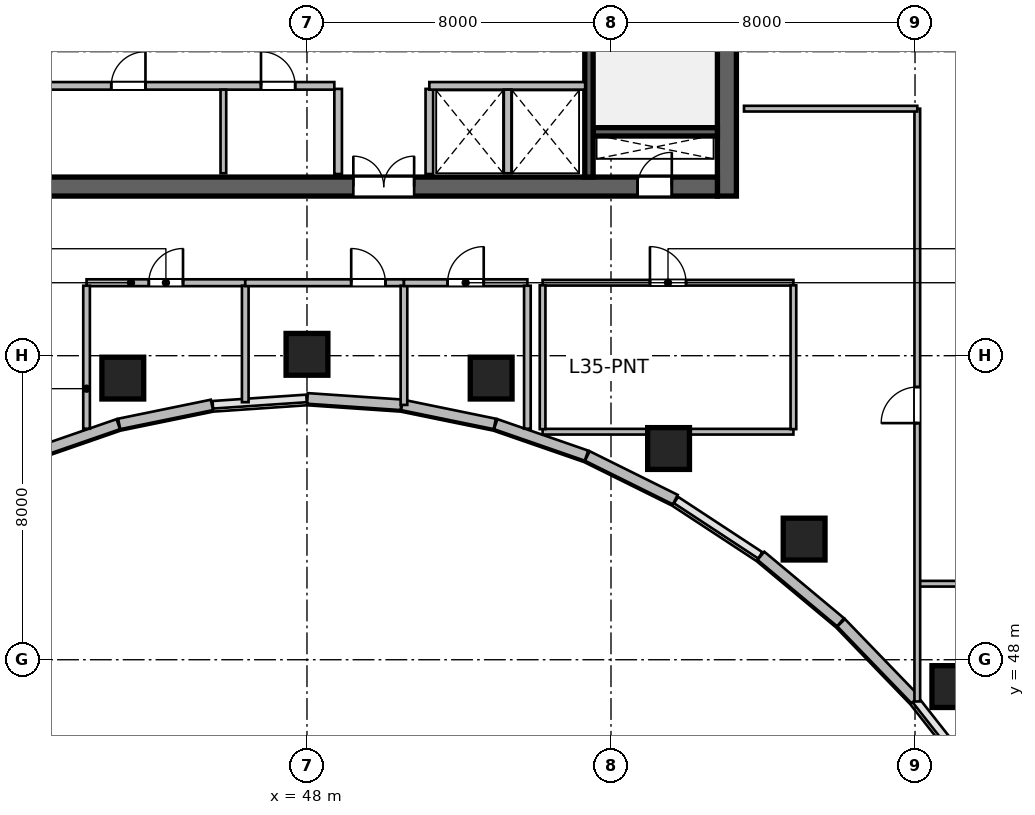
"""IFC4 building model, lengths in metres.
Left out: names, types, materials, properties, quantities, classifications, styles, units other than length and angle.
Written with IfcOpenShell. Run it as: python <this file> out.ifc"""

import sys

from ifc_helpers import new_model, si_unit, direction, frame, frame_2d, origin, origin_2d, place, context, subcontext, project, spatial, rectangle, circle, extrude, source, transform, mapped, element, fill, save


model = new_model("IFC4")
c1 = context("Model", 3, precision=1e-05, world=origin(), true_north=direction((0.0, 1.0)))
c2 = subcontext(c1, "Body", "Model", "MODEL_VIEW")
j1 = project(units=[si_unit("LENGTHUNIT", "METRE"), si_unit("PLANEANGLEUNIT", "RADIAN")], contexts=[c1])
p1 = place(None, origin())
s1 = spatial("IfcSite", under=j1, at=p1, CompositionType="ELEMENT")
p2 = place(p1, origin())
s2 = spatial("IfcBuilding", under=s1, at=p2, CompositionType="ELEMENT")
p3 = place(p2, frame((0.0, 0.0, 146.7)))
s3 = spatial("IfcBuildingStorey", under=s2, at=p3, CompositionType="ELEMENT", Elevation=146.7)
m1 = source(origin(), c2, "Body", "SweptSolid", [
    extrude(rectangle(XDim=12.0, YDim=0.5, at=frame_2d((6.0, 0.0))), origin(), (0.0, 0.0, 1.0), 3.9),
])
p4 = place(p3, frame((59.05, 60.2, 0.0), z_axis=(0.0, 0.0, 1.0), x_axis=(0.0, 1.0, 0.0)))
e1 = element("IfcWall", 1, at=p4, inside=s3, PredefinedType="SHEAR", context=c2, shape_type="MappedRepresentation", body=[
    mapped(m1, transform((0.0, 0.0, 0.0), scale=1.0)),
])
m2 = source(origin(), c2, "Body", "SweptSolid", [
    extrude(rectangle(XDim=21.6, YDim=0.5, at=frame_2d((10.8, 0.0))), origin(), (0.0, 0.0, 1.0), 3.9),
])
p5 = place(p3, frame((37.2, 60.45, 0.0), z_axis=(0.0, 0.0, 1.0), x_axis=(1.0, 0.0, 0.0)))
e2 = element("IfcWall", 2, at=p5, inside=s3, PredefinedType="SHEAR", context=c2, shape_type="MappedRepresentation", body=[
    mapped(m2, transform((0.0, 0.0, 0.0), scale=1.0)),
])
p6 = place(p5, frame((1.1, 0.0, 0.0)))
e3 = element("IfcOpeningElement", 3, at=p6, cuts=e2, PredefinedType="OPENING", context=c2, shape_type="SweptSolid", body=[
    extrude(rectangle(XDim=1.15, YDim=2.15, at=frame_2d((0.575, 1.075))), frame((0.0, 0.26, 0.0), z_axis=(0.0, -1.0, 0.0), x_axis=(1.0, 0.0, 0.0)), (0.0, 0.0, 1.0), 0.52),
])
p7 = place(p5, frame((19.5, 0.0, 0.0)))
e4 = element("IfcOpeningElement", 4, at=p7, cuts=e2, PredefinedType="OPENING", context=c2, shape_type="SweptSolid", body=[
    extrude(rectangle(XDim=0.9, YDim=2.1, at=frame_2d((0.45, 1.05))), frame((0.0, 0.26, 0.0), z_axis=(0.0, -1.0, 0.0), x_axis=(1.0, 0.0, 0.0)), (0.0, 0.0, 1.0), 0.52),
])
p8 = place(p5, frame((12.02, 0.0, 0.0)))
e5 = element("IfcOpeningElement", 5, at=p8, cuts=e2, PredefinedType="OPENING", context=c2, shape_type="SweptSolid", body=[
    extrude(rectangle(XDim=1.6, YDim=2.15, at=frame_2d((0.8, 1.075))), frame((0.0, 0.26, 0.0), z_axis=(0.0, -1.0, 0.0), x_axis=(1.0, 0.0, 0.0)), (0.0, 0.0, 1.0), 0.52),
])
m3 = source(origin(), c2, "Body", "SweptSolid", [
    extrude(rectangle(XDim=3.27, YDim=0.22, at=frame_2d((1.635, 0.0))), origin(), (0.0, 0.0, 1.0), 3.9),
])
p9 = place(p3, frame((55.53, 61.89, 0.0), z_axis=(0.0, 0.0, 1.0), x_axis=(1.0, 0.0, 0.0)))
e6 = element("IfcWall", 6, at=p9, inside=s3, PredefinedType="SHEAR", context=c2, shape_type="MappedRepresentation", body=[
    mapped(m3, transform((0.0, 0.0, 0.0), scale=1.0)),
])
m4 = source(origin(), c2, "Body", "SweptSolid", [
    extrude(rectangle(XDim=11.0, YDim=0.22, at=frame_2d((5.5, 0.0))), origin(), (0.0, 0.0, 1.0), 3.9),
])
p10 = place(p3, frame((55.42, 60.7, 0.0), z_axis=(0.0, 0.0, 1.0), x_axis=(0.0, 1.0, 0.0)))
e7 = element("IfcWall", 7, at=p10, inside=s3, PredefinedType="SHEAR", context=c2, shape_type="MappedRepresentation", body=[
    mapped(m4, transform((0.0, 0.0, 0.0), scale=1.0)),
])
p11 = place(p10, frame((9.545, 0.0, 0.0)))
e8 = element("IfcOpeningElement", 8, at=p11, cuts=e7, PredefinedType="OPENING", context=c2, shape_type="SweptSolid", body=[
    extrude(rectangle(XDim=1.15, YDim=2.15, at=frame_2d((0.575, 1.075))), frame((0.0, 0.12, 0.0), z_axis=(0.0, -1.0, 0.0), x_axis=(1.0, 0.0, 0.0)), (0.0, 0.0, 1.0), 0.24),
])
m5 = source(origin(), c2, "Body", "SweptSolid", [
    extrude(circle(Radius=0.55, at=origin_2d()), origin(), (0.0, 0.0, 1.0), 3.9),
])
for number, where, z_axis, x_axis in (
    (9, (43.154, 55.411, 0.0), (0.0, 0.0, 1.0), (-0.143, 0.99, 0.0)),
    (10, (48.0, 56.036, 0.0), (0.0, 0.0, 1.0), (0.0, 1.0, 0.0)),
    (11, (52.846, 55.411, 0.0), (0.0, 0.0, 1.0), (0.143, 0.99, 0.0)),
    (12, (57.515, 53.558, 0.0), (0.0, 0.0, 1.0), (0.289, 0.957, 0.0)),
    (13, (61.082, 51.175, 0.0), (0.0, 0.0, 1.0), (0.409, 0.912, 0.0)),
    (14, (64.996, 47.294, 0.0), (0.0, 0.0, 1.0), (0.558, 0.83, 0.0)),
):
    element("IfcColumn", number, at=place(p3, frame(where, z_axis=z_axis, x_axis=x_axis)), inside=s3, PredefinedType="COLUMN", context=c2, shape_type="MappedRepresentation", body=[
        mapped(m5, transform((0.0, 0.0, 0.0), scale=1.0)),
    ])
m6 = source(origin(), c2, "Body", "SweptSolid", [
    extrude(rectangle(XDim=2.812, YDim=0.28, at=frame_2d((1.406, 0.0))), origin(), (0.0, 0.0, 1.0), 3.65),
])
p12 = place(p3, frame((64.008, 46.95, 0.0), z_axis=(0.0, 0.0, 1.0), x_axis=(-0.694583668785, 0.719411931411, 0.0)))
e15 = element("IfcWall", 15, at=p12, inside=s3, PredefinedType="SOLIDWALL", context=c2, shape_type="MappedRepresentation", body=[
    mapped(m6, transform((0.0, 0.0, 0.0), scale=1.0)),
])
m7 = source(origin(), c2, "Body", "SweptSolid", [
    extrude(rectangle(XDim=2.729, YDim=0.28, at=frame_2d((1.365, 0.0))), origin(), (0.0, 0.0, 1.0), 3.65),
])
p13 = place(p3, frame((62.041, 48.987, 0.0), z_axis=(0.0, 0.0, 1.0), x_axis=(-0.767957284255, 0.640501061326, 0.0)))
e16 = element("IfcWall", 16, at=p13, inside=s3, PredefinedType="SOLIDWALL", context=c2, shape_type="MappedRepresentation", body=[
    mapped(m7, transform((0.0, 0.0, 0.0), scale=1.0)),
])
m8 = source(origin(), c2, "Body", "SweptSolid", [
    extrude(rectangle(XDim=2.584, YDim=0.28, at=frame_2d((1.292, 0.0))), origin(), (0.0, 0.0, 1.0), 3.65),
])
p14 = place(p3, frame((57.692, 52.213, 0.0), z_axis=(0.0, 0.0, 1.0), x_axis=(-0.895989792847, 0.44407464588, 0.0)))
e17 = element("IfcWall", 17, at=p14, inside=s3, PredefinedType="SOLIDWALL", context=c2, shape_type="MappedRepresentation", body=[
    mapped(m8, transform((0.0, 0.0, 0.0), scale=1.0)),
])
m9 = source(origin(), c2, "Body", "SweptSolid", [
    extrude(rectangle(XDim=2.53, YDim=0.28, at=frame_2d((1.265, 0.0))), origin(), (0.0, 0.0, 1.0), 3.65),
])
p15 = place(p3, frame((55.355, 53.37, 0.0), z_axis=(0.0, 0.0, 1.0), x_axis=(-0.944872429646, 0.327438683872, 0.0)))
e18 = element("IfcWall", 18, at=p15, inside=s3, PredefinedType="SOLIDWALL", context=c2, shape_type="MappedRepresentation", body=[
    mapped(m9, transform((0.0, 0.0, 0.0), scale=1.0)),
])
m10 = source(origin(), c2, "Body", "SweptSolid", [
    extrude(rectangle(XDim=2.491, YDim=0.28, at=frame_2d((1.246, 0.0))), origin(), (0.0, 0.0, 1.0), 3.65),
])
p16 = place(p3, frame((52.942, 54.205, 0.0), z_axis=(0.0, 0.0, 1.0), x_axis=(-0.979630885979, 0.200806691214, 0.0)))
e19 = element("IfcWall", 19, at=p16, inside=s3, PredefinedType="SOLIDWALL", context=c2, shape_type="MappedRepresentation", body=[
    mapped(m10, transform((0.0, 0.0, 0.0), scale=1.0)),
])
m11 = source(origin(), c2, "Body", "SweptSolid", [
    extrude(rectangle(XDim=2.471, YDim=0.28, at=frame_2d((1.236, 0.0))), origin(), (0.0, 0.0, 1.0), 3.65),
])
p17 = place(p3, frame((50.478, 54.708, 0.0), z_axis=(0.0, 0.0, 1.0), x_axis=(-0.997708006929, 0.067666335123, 0.0)))
e20 = element("IfcWall", 20, at=p17, inside=s3, PredefinedType="SOLIDWALL", context=c2, shape_type="MappedRepresentation", body=[
    mapped(m11, transform((0.0, 0.0, 0.0), scale=1.0)),
])
p18 = place(p3, frame((45.498, 54.705, 0.0), z_axis=(0.0, 0.0, 1.0), x_axis=(-0.979630885979, -0.200806691214, 0.0)))
e21 = element("IfcWall", 21, at=p18, inside=s3, PredefinedType="SOLIDWALL", context=c2, shape_type="MappedRepresentation", body=[
    mapped(m10, transform((0.0, 0.0, 0.0), scale=1.0)),
])
p19 = place(p3, frame((43.035, 54.198, 0.0), z_axis=(0.0, 0.0, 1.0), x_axis=(-0.944872429646, -0.327438683872, 0.0)))
e22 = element("IfcWall", 22, at=p19, inside=s3, PredefinedType="SOLIDWALL", context=c2, shape_type="MappedRepresentation", body=[
    mapped(m9, transform((0.0, 0.0, 0.0), scale=1.0)),
])
m12 = source(origin(), c2, "Body", "SweptSolid", [
    extrude(rectangle(XDim=2.24, YDim=0.2, at=frame_2d((1.12, 0.0))), origin(), (0.0, 0.0, 1.0), 3.65),
])
for number, where, z_axis, x_axis in (
    (23, (48.82, 60.78, 0.0), (0.0, 0.0, 1.0), (0.0, 1.0, 0.0)),
    (24, (51.22, 60.78, 0.0), (0.0, 0.0, 1.0), (0.0, 1.0, 0.0)),
):
    element("IfcWall", number, at=place(p3, frame(where, z_axis=z_axis, x_axis=x_axis)), inside=s3, PredefinedType="SOLIDWALL", context=c2, shape_type="MappedRepresentation", body=[
        mapped(m12, transform((0.0, 0.0, 0.0), scale=1.0)),
    ])
m13 = source(origin(), c2, "Body", "SweptSolid", [
    extrude(rectangle(XDim=8.02, YDim=0.2, at=frame_2d((4.01, 0.0))), origin(), (0.0, 0.0, 1.0), 3.65),
])
p20 = place(p3, frame((40.7, 63.1, 0.0), z_axis=(0.0, 0.0, 1.0), x_axis=(1.0, 0.0, 0.0)))
e25 = element("IfcWall", 25, at=p20, inside=s3, PredefinedType="SOLIDWALL", context=c2, shape_type="MappedRepresentation", body=[
    mapped(m13, transform((0.0, 0.0, 0.0), scale=1.0)),
])
p21 = place(p20, frame((2.15, 0.0, 0.0)))
e26 = element("IfcOpeningElement", 26, at=p21, cuts=e25, PredefinedType="OPENING", context=c2, shape_type="SweptSolid", body=[
    extrude(rectangle(XDim=0.9, YDim=2.1, at=frame_2d((0.45, 1.05))), frame((0.0, 0.11, 0.0), z_axis=(0.0, -1.0, 0.0), x_axis=(1.0, 0.0, 0.0)), (0.0, 0.0, 1.0), 0.22),
])
p22 = place(p20, frame((6.09, 0.0, 0.0)))
e27 = element("IfcOpeningElement", 27, at=p22, cuts=e25, PredefinedType="OPENING", context=c2, shape_type="SweptSolid", body=[
    extrude(rectangle(XDim=0.9, YDim=2.1, at=frame_2d((0.45, 1.05))), frame((0.0, 0.11, 0.0), z_axis=(0.0, -1.0, 0.0), x_axis=(1.0, 0.0, 0.0)), (0.0, 0.0, 1.0), 0.22),
])
m14 = source(origin(), c2, "Body", "SweptSolid", [
    extrude(rectangle(XDim=4.1, YDim=0.2, at=frame_2d((2.05, 0.0))), origin(), (0.0, 0.0, 1.0), 3.65),
])
p23 = place(p3, frame((51.22, 63.1, 0.0), z_axis=(0.0, 0.0, 1.0), x_axis=(1.0, 0.0, 0.0)))
e28 = element("IfcWall", 28, at=p23, inside=s3, PredefinedType="SOLIDWALL", context=c2, shape_type="MappedRepresentation", body=[
    mapped(m14, transform((0.0, 0.0, 0.0), scale=1.0)),
])
m15 = source(origin(), c2, "Body", "SweptSolid", [
    extrude(rectangle(XDim=2.2, YDim=0.15, at=frame_2d((1.1, 0.0))), origin(), (0.0, 0.0, 1.0), 3.65),
])
p24 = place(p3, frame((45.8, 60.8, 0.0), z_axis=(0.0, 0.0, 1.0), x_axis=(0.0, 1.0, 0.0)))
e29 = element("IfcWall", 29, at=p24, inside=s3, PredefinedType="PARTITIONING", context=c2, shape_type="MappedRepresentation", body=[
    mapped(m15, transform((0.0, 0.0, 0.0), scale=1.0)),
])
m16 = source(origin(), c2, "Body", "SweptSolid", [
    extrude(rectangle(XDim=2.2, YDim=0.2, at=frame_2d((1.1, 0.0))), origin(), (0.0, 0.0, 1.0), 3.65),
])
p25 = place(p3, frame((53.28, 60.8, 0.0), z_axis=(0.0, 0.0, 1.0), x_axis=(0.0, 1.0, 0.0)))
e30 = element("IfcWall", 30, at=p25, inside=s3, PredefinedType="SOLIDWALL", context=c2, shape_type="MappedRepresentation", body=[
    mapped(m16, transform((0.0, 0.0, 0.0), scale=1.0)),
])
m17 = source(origin(), c2, "Body", "SweptSolid", [
    extrude(rectangle(XDim=4.176, YDim=0.18, at=frame_2d((2.088, 0.0))), origin(), (0.0, 0.0, 1.0), 3.65),
])
p26 = place(p3, frame((42.2, 57.92, 0.0), z_axis=(0.0, 0.0, 1.0), x_axis=(1.0, 0.0, 0.0)))
e31 = element("IfcWall", 31, at=p26, inside=s3, PredefinedType="PLUMBINGWALL", context=c2, shape_type="MappedRepresentation", body=[
    mapped(m17, transform((0.0, 0.0, 0.0), scale=1.0)),
])
p27 = place(p26, frame((1.638, 0.0, 0.0)))
e32 = element("IfcOpeningElement", 32, at=p27, cuts=e31, PredefinedType="OPENING", context=c2, shape_type="SweptSolid", body=[
    extrude(rectangle(XDim=0.9, YDim=2.08, at=frame_2d((0.45, 1.04))), frame((0.0, 0.1, 0.0), z_axis=(0.0, -1.0, 0.0), x_axis=(1.0, 0.0, 0.0)), (0.0, 0.0, 1.0), 0.2),
])
m18 = source(origin(), c2, "Body", "SweptSolid", [
    extrude(rectangle(XDim=3.763, YDim=0.175, at=frame_2d((1.881, 0.0))), origin(), (0.0, 0.0, 1.0), 3.65),
])
p28 = place(p3, frame((42.2, 54.079, 0.0), z_axis=(0.0, 0.0, 1.0), x_axis=(0.0, 1.0, 0.0)))
e33 = element("IfcWall", 33, at=p28, inside=s3, PredefinedType="PARTITIONING", context=c2, shape_type="MappedRepresentation", body=[
    mapped(m18, transform((0.0, 0.0, 0.0), scale=1.0)),
])
m19 = source(origin(), c2, "Body", "SweptSolid", [
    extrude(rectangle(XDim=3.065, YDim=0.175, at=frame_2d((1.533, 0.0))), origin(), (0.0, 0.0, 1.0), 3.65),
])
p29 = place(p3, frame((46.376, 54.776, 0.0), z_axis=(0.0, 0.0, 1.0), x_axis=(0.0, 1.0, 0.0)))
e34 = element("IfcWall", 34, at=p29, inside=s3, PredefinedType="PARTITIONING", context=c2, shape_type="MappedRepresentation", body=[
    mapped(m19, transform((0.0, 0.0, 0.0), scale=1.0)),
])
p30 = place(p3, frame((46.376, 57.92, 0.0), z_axis=(0.0, 0.0, 1.0), x_axis=(1.0, 0.0, 0.0)))
e35 = element("IfcWall", 35, at=p30, inside=s3, PredefinedType="PLUMBINGWALL", context=c2, shape_type="MappedRepresentation", body=[
    mapped(m17, transform((0.0, 0.0, 0.0), scale=1.0)),
])
p31 = place(p30, frame((2.788, 0.0, 0.0)))
e36 = element("IfcOpeningElement", 36, at=p31, cuts=e35, PredefinedType="OPENING", context=c2, shape_type="SweptSolid", body=[
    extrude(rectangle(XDim=0.9, YDim=2.08, at=frame_2d((0.45, 1.04))), frame((0.0, 0.1, 0.0), z_axis=(0.0, -1.0, 0.0), x_axis=(1.0, 0.0, 0.0)), (0.0, 0.0, 1.0), 0.2),
])
m20 = source(origin(), c2, "Body", "SweptSolid", [
    extrude(rectangle(XDim=3.136, YDim=0.175, at=frame_2d((1.568, 0.0))), origin(), (0.0, 0.0, 1.0), 3.65),
])
p32 = place(p3, frame((50.552, 54.705, 0.0), z_axis=(0.0, 0.0, 1.0), x_axis=(0.0, 1.0, 0.0)))
e37 = element("IfcWall", 37, at=p32, inside=s3, PredefinedType="PARTITIONING", context=c2, shape_type="MappedRepresentation", body=[
    mapped(m20, transform((0.0, 0.0, 0.0), scale=1.0)),
])
m21 = source(origin(), c2, "Body", "SweptSolid", [
    extrude(rectangle(XDim=3.248, YDim=0.18, at=frame_2d((1.624, 0.0))), origin(), (0.0, 0.0, 1.0), 3.65),
])
p33 = place(p3, frame((50.552, 57.92, 0.0), z_axis=(0.0, 0.0, 1.0), x_axis=(1.0, 0.0, 0.0)))
e38 = element("IfcWall", 38, at=p33, inside=s3, PredefinedType="PLUMBINGWALL", context=c2, shape_type="MappedRepresentation", body=[
    mapped(m21, transform((0.0, 0.0, 0.0), scale=1.0)),
])
p34 = place(p33, frame((1.149, 0.0, 0.0)))
e39 = element("IfcOpeningElement", 39, at=p34, cuts=e38, PredefinedType="OPENING", context=c2, shape_type="SweptSolid", body=[
    extrude(rectangle(XDim=0.95, YDim=2.12, at=frame_2d((0.475, 1.06))), frame((0.0, 0.1, 0.0), z_axis=(0.0, -1.0, 0.0), x_axis=(1.0, 0.0, 0.0)), (0.0, 0.0, 1.0), 0.2),
])
p35 = place(p3, frame((53.8, 54.079, 0.0), z_axis=(0.0, 0.0, 1.0), x_axis=(0.0, 1.0, 0.0)))
e40 = element("IfcWall", 40, at=p35, inside=s3, PredefinedType="PARTITIONING", context=c2, shape_type="MappedRepresentation", body=[
    mapped(m18, transform((0.0, 0.0, 0.0), scale=1.0)),
])
m22 = source(origin(), c2, "Body", "SweptSolid", [
    extrude(rectangle(XDim=6.6, YDim=0.15, at=frame_2d((3.3, 0.0))), origin(), (0.0, 0.0, 1.0), 3.095),
])
p36 = place(p3, frame((54.2, 54.0, 0.0), z_axis=(0.0, 0.0, 1.0), x_axis=(1.0, 0.0, 0.0)))
e41 = element("IfcWall", 41, at=p36, inside=s3, PredefinedType="PARTITIONING", context=c2, shape_type="MappedRepresentation", body=[
    mapped(m22, transform((0.0, 0.0, 0.0), scale=1.0)),
])
m23 = source(origin(), c2, "Body", "SweptSolid", [
    extrude(rectangle(XDim=6.6, YDim=0.15, at=frame_2d((3.3, 0.0))), origin(), (0.0, 0.0, 1.0), 3.65),
])
p37 = place(p3, frame((54.2, 57.92, 0.0), z_axis=(0.0, 0.0, 1.0), x_axis=(1.0, 0.0, 0.0)))
e42 = element("IfcWall", 42, at=p37, inside=s3, PredefinedType="PARTITIONING", context=c2, shape_type="MappedRepresentation", body=[
    mapped(m23, transform((0.0, 0.0, 0.0), scale=1.0)),
])
p38 = place(p37, frame((2.825, 0.0, 0.0)))
e43 = element("IfcOpeningElement", 43, at=p38, cuts=e42, PredefinedType="OPENING", context=c2, shape_type="SweptSolid", body=[
    extrude(rectangle(XDim=0.95, YDim=2.1, at=frame_2d((0.475, 1.05))), frame((0.0, 0.085, 0.0), z_axis=(0.0, -1.0, 0.0), x_axis=(1.0, 0.0, 0.0)), (0.0, 0.0, 1.0), 0.17),
])
m24 = source(origin(), c2, "Body", "SweptSolid", [
    extrude(rectangle(XDim=3.785, YDim=0.15, at=frame_2d((1.893, 0.0))), origin(), (0.0, 0.0, 1.0), 3.65),
])
for number, where, z_axis, x_axis in (
    (44, (54.2, 54.067, 0.0), (0.0, 0.0, 1.0), (0.0, 1.0, 0.0)),
    (45, (60.8, 54.067, 0.0), (0.0, 0.0, 1.0), (0.0, 1.0, 0.0)),
):
    element("IfcWall", number, at=place(p3, frame(where, z_axis=z_axis, x_axis=x_axis)), inside=s3, PredefinedType="PARTITIONING", context=c2, shape_type="MappedRepresentation", body=[
        mapped(m24, transform((0.0, 0.0, 0.0), scale=1.0)),
    ])
m25 = source(origin(), c2, "Body", "SweptSolid", [
    extrude(rectangle(XDim=2.5, YDim=0.15, at=frame_2d((1.25, 0.0))), origin(), (0.0, 0.0, 1.0), 3.65),
])
p39 = place(p3, frame((64.1, 50.0, 0.0), z_axis=(0.0, 0.0, 1.0), x_axis=(1.0, 0.0, 0.0)))
e46 = element("IfcWall", 46, at=p39, inside=s3, PredefinedType="PARTITIONING", context=c2, shape_type="MappedRepresentation", body=[
    mapped(m25, transform((0.0, 0.0, 0.0), scale=1.0)),
])
m26 = source(origin(), c2, "Body", "SweptSolid", [
    extrude(rectangle(XDim=15.598, YDim=0.15, at=frame_2d((7.799, 0.0))), origin(), (0.0, 0.0, 1.0), 2.942),
])
p40 = place(p3, frame((64.06, 46.902, 0.0), z_axis=(0.0, 0.0, 1.0), x_axis=(0.0, 1.0, 0.0)))
e47 = element("IfcWall", 47, at=p40, inside=s3, PredefinedType="PARTITIONING", context=c2, shape_type="MappedRepresentation", body=[
    mapped(m26, transform((0.0, 0.0, 0.0), scale=1.0)),
])
p41 = place(p40, frame((7.324, 0.0, 0.0)))
e48 = element("IfcOpeningElement", 48, at=p41, cuts=e47, PredefinedType="OPENING", context=c2, shape_type="SweptSolid", body=[
    extrude(rectangle(XDim=0.95, YDim=2.1, at=frame_2d((0.475, 1.05))), frame((0.0, 0.085, 0.0), z_axis=(0.0, -1.0, 0.0), x_axis=(1.0, 0.0, 0.0)), (0.0, 0.0, 1.0), 0.17),
])
m27 = source(origin(), c2, "Body", "SweptSolid", [
    extrude(rectangle(XDim=4.56, YDim=0.15, at=frame_2d((2.28, 0.0))), origin(), (0.0, 0.0, 1.0), 3.65),
])
p42 = place(p3, frame((59.5, 62.5, 0.0), z_axis=(0.0, 0.0, 1.0), x_axis=(1.0, 0.0, 0.0)))
e49 = element("IfcWall", 49, at=p42, inside=s3, PredefinedType="PARTITIONING", context=c2, shape_type="MappedRepresentation", body=[
    mapped(m27, transform((0.0, 0.0, 0.0), scale=1.0)),
])
m28 = source(origin(), c2, "Body", "SweptSolid", [
    extrude(rectangle(XDim=0.9, YDim=2.1, at=frame_2d((0.45, 1.05))), frame((0.0, 0.025, 0.0), z_axis=(0.0, -1.0, 0.0), x_axis=(1.0, 0.0, 0.0)), (0.0, 0.0, 1.0), 0.05),
])
p43 = place(p7, origin())
e50 = element("IfcDoor", 50, at=p43, inside=s3, OperationType="SINGLE_SWING_RIGHT", PredefinedType="DOOR", context=c2, shape_type="MappedRepresentation", body=[
    mapped(m28, transform((0.0, 0.0, 0.0), scale=1.0)),
])
fill(e4, e50)
m29 = source(origin(), c2, "Body", "SweptSolid", [
    extrude(rectangle(XDim=1.6, YDim=2.15, at=frame_2d((0.8, 1.075))), frame((0.0, 0.025, 0.0), z_axis=(0.0, -1.0, 0.0), x_axis=(1.0, 0.0, 0.0)), (0.0, 0.0, 1.0), 0.05),
])
p44 = place(p8, origin())
e51 = element("IfcDoor", 51, at=p44, inside=s3, OperationType="DOUBLE_DOOR_SINGLE_SWING", PredefinedType="DOOR", context=c2, shape_type="MappedRepresentation", body=[
    mapped(m29, transform((0.0, 0.0, 0.0), scale=1.0)),
])
fill(e5, e51)
p45 = place(p21, origin())
e52 = element("IfcDoor", 52, at=p45, inside=s3, OperationType="SINGLE_SWING_RIGHT", PredefinedType="DOOR", context=c2, shape_type="MappedRepresentation", body=[
    mapped(m28, transform((0.0, 0.0, 0.0), scale=1.0)),
])
fill(e26, e52)
p46 = place(p22, origin())
e53 = element("IfcDoor", 53, at=p46, inside=s3, OperationType="SINGLE_SWING_LEFT", PredefinedType="DOOR", context=c2, shape_type="MappedRepresentation", body=[
    mapped(m28, transform((0.0, 0.0, 0.0), scale=1.0)),
])
fill(e27, e53)
m30 = source(origin(), c2, "Body", "SweptSolid", [
    extrude(rectangle(XDim=0.9, YDim=2.08, at=frame_2d((0.45, 1.04))), frame((0.0, 0.025, 0.0), z_axis=(0.0, -1.0, 0.0), x_axis=(1.0, 0.0, 0.0)), (0.0, 0.0, 1.0), 0.05),
])
p47 = place(p27, origin())
e54 = element("IfcDoor", 54, at=p47, inside=s3, OperationType="SINGLE_SWING_RIGHT", PredefinedType="DOOR", context=c2, shape_type="MappedRepresentation", body=[
    mapped(m30, transform((0.0, 0.0, 0.0), scale=1.0)),
])
fill(e32, e54)
p48 = place(p31, origin())
e55 = element("IfcDoor", 55, at=p48, inside=s3, OperationType="SINGLE_SWING_LEFT", PredefinedType="DOOR", context=c2, shape_type="MappedRepresentation", body=[
    mapped(m30, transform((0.0, 0.0, 0.0), scale=1.0)),
])
fill(e36, e55)
m31 = source(origin(), c2, "Body", "SweptSolid", [
    extrude(rectangle(XDim=0.95, YDim=2.12, at=frame_2d((0.475, 1.06))), frame((0.0, 0.025, 0.0), z_axis=(0.0, -1.0, 0.0), x_axis=(1.0, 0.0, 0.0)), (0.0, 0.0, 1.0), 0.05),
])
p49 = place(p34, origin())
e56 = element("IfcDoor", 56, at=p49, inside=s3, OperationType="SINGLE_SWING_RIGHT", PredefinedType="DOOR", context=c2, shape_type="MappedRepresentation", body=[
    mapped(m31, transform((0.0, 0.0, 0.0), scale=1.0)),
])
fill(e39, e56)
m32 = source(origin(), c2, "Body", "SweptSolid", [
    extrude(rectangle(XDim=0.95, YDim=2.1, at=frame_2d((0.475, 1.05))), frame((0.0, 0.025, 0.0), z_axis=(0.0, -1.0, 0.0), x_axis=(1.0, 0.0, 0.0)), (0.0, 0.0, 1.0), 0.05),
])
p50 = place(p38, origin())
e57 = element("IfcDoor", 57, at=p50, inside=s3, OperationType="SINGLE_SWING_LEFT", PredefinedType="DOOR", context=c2, shape_type="MappedRepresentation", body=[
    mapped(m32, transform((0.0, 0.0, 0.0), scale=1.0)),
])
fill(e43, e57)
p51 = place(p41, origin())
e58 = element("IfcDoor", 58, at=p51, inside=s3, OperationType="SINGLE_SWING_LEFT", PredefinedType="DOOR", context=c2, shape_type="MappedRepresentation", body=[
    mapped(m32, transform((0.0, 0.0, 0.0), scale=1.0)),
])
fill(e48, e58)
save(model, sys.argv[1])
